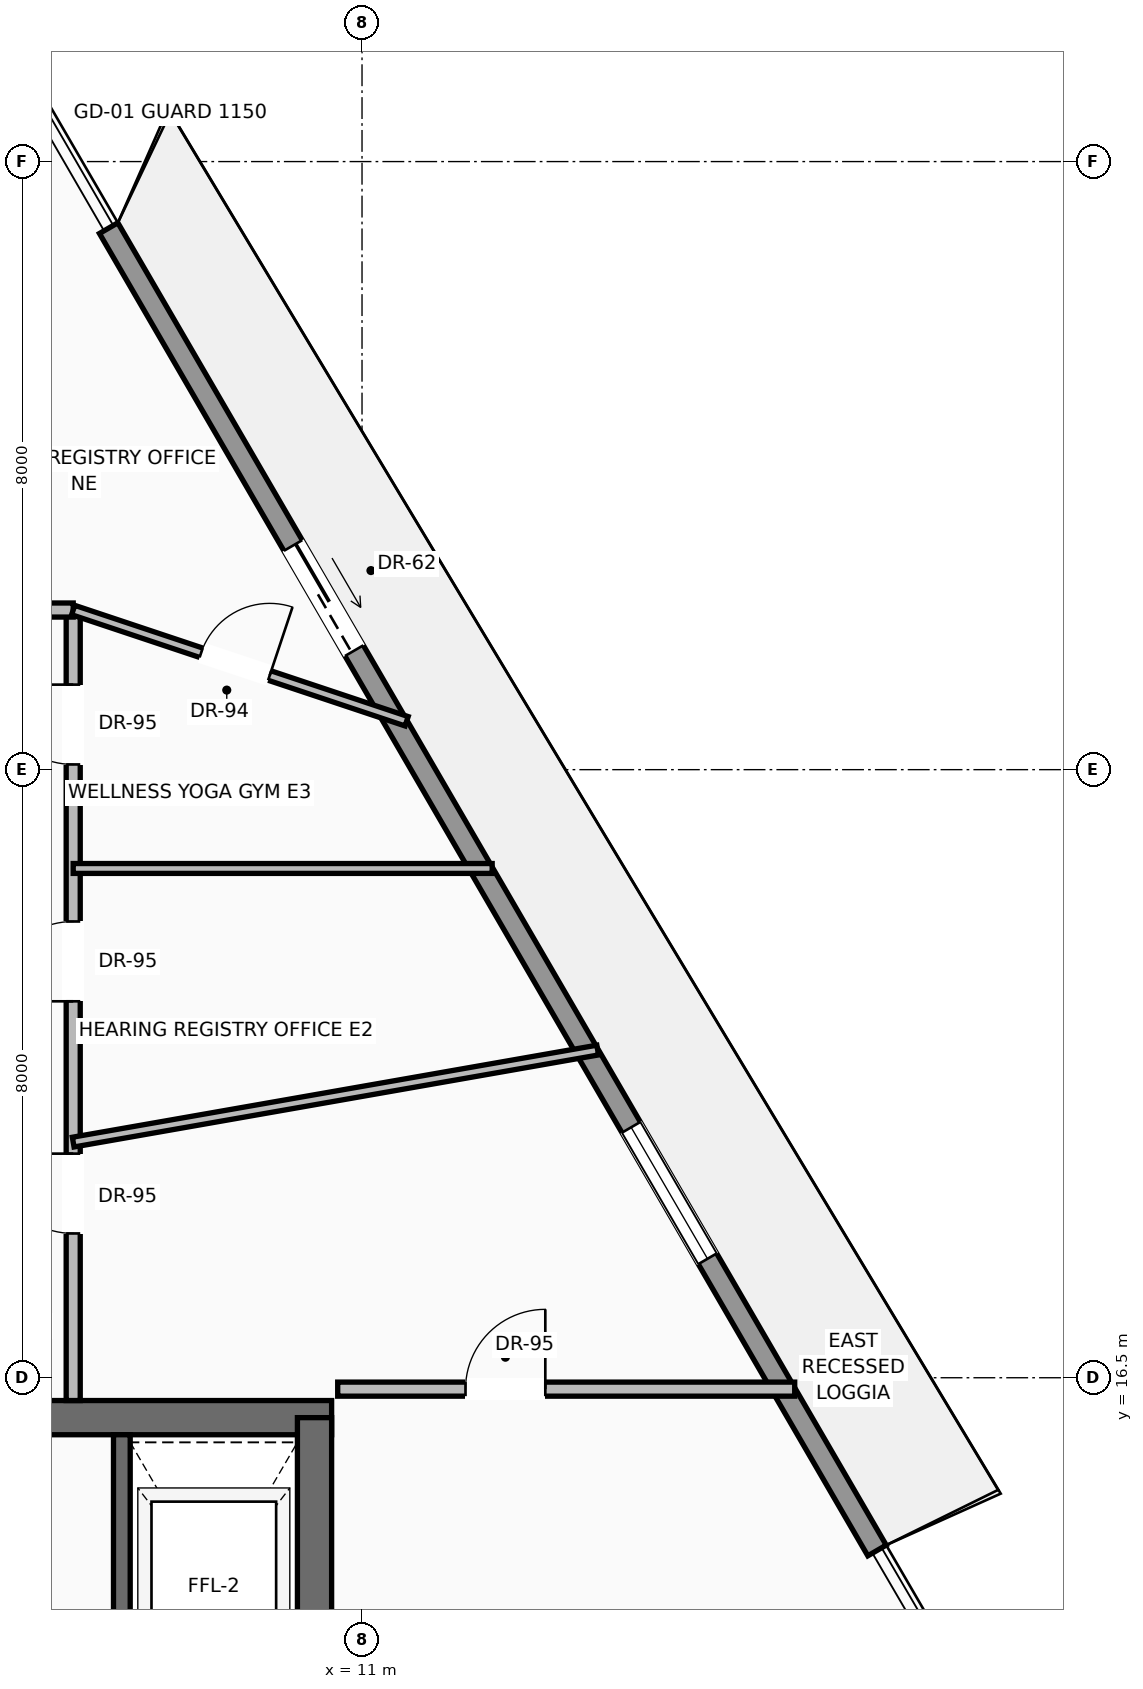
"""IFC4 building model, lengths in metres.
Left out: names, types, materials, properties, quantities, classifications, styles, units other than length and angle.
Written with IfcOpenShell. Run it as: python <this file> out.ifc"""

import sys

from ifc_helpers import new_model, si_unit, direction, frame, frame_2d, origin, place, context, subcontext, project, spatial, rectangle, extrude, source, transform, mapped, element, fill, save


model = new_model("IFC4")
c1 = context("Model", 3, precision=1e-05, world=origin(), true_north=direction((0.0, 1.0)))
c2 = subcontext(c1, "Body", "Model", "MODEL_VIEW")
j1 = project(units=[si_unit("LENGTHUNIT", "METRE"), si_unit("PLANEANGLEUNIT", "RADIAN")], contexts=[c1])
p1 = place(None, origin())
s1 = spatial("IfcSite", under=j1, at=p1, CompositionType="ELEMENT")
p2 = place(p1, origin())
s2 = spatial("IfcBuilding", under=s1, at=p2, CompositionType="ELEMENT")
p3 = place(p2, frame((0.0, 0.0, 290.25)))
s3 = spatial("IfcBuildingStorey", under=s2, at=p3, CompositionType="ELEMENT", Elevation=290.25)
p4 = place(p3, frame((-10.6, 15.975, 0.0), z_axis=(0.0, 0.0, 1.0), x_axis=(1.0, 0.0, 0.0)))
e1 = element("IfcWall", 1, at=p4, inside=s3, PredefinedType="SHEAR", context=c2, shape_type="SweptSolid", body=[
    extrude(rectangle(XDim=21.2, YDim=0.45, at=frame_2d((10.6, 0.0))), origin(), (0.0, 0.0, 1.0), 3.24),
])
p5 = place(p4, frame((3.17, 0.0, 0.0)))
e2 = element("IfcOpeningElement", 2, at=p5, cuts=e1, PredefinedType="OPENING", context=c2, shape_type="SweptSolid", body=[
    extrude(rectangle(XDim=1.3, YDim=2.3, at=frame_2d((0.65, 1.15))), frame((0.0, 0.235, 0.0), z_axis=(0.0, -1.0, 0.0), x_axis=(1.0, 0.0, 0.0)), (0.0, 0.0, 1.0), 0.47),
])
p6 = place(p4, frame((9.6, 0.0, 0.0)))
e3 = element("IfcOpeningElement", 3, at=p6, cuts=e1, PredefinedType="OPENING", context=c2, shape_type="SweptSolid", body=[
    extrude(rectangle(XDim=2.0, YDim=2.4, at=frame_2d((1.0, 1.2))), frame((0.0, 0.235, 0.0), z_axis=(0.0, -1.0, 0.0), x_axis=(1.0, 0.0, 0.0)), (0.0, 0.0, 1.0), 0.47),
])
p7 = place(p3, frame((10.375, 0.625, 0.0), z_axis=(0.0, 0.0, 1.0), x_axis=(0.0, 1.0, 0.0)))
e4 = element("IfcWall", 4, at=p7, inside=s3, PredefinedType="SHEAR", context=c2, shape_type="SweptSolid", body=[
    extrude(rectangle(XDim=15.35, YDim=0.45, at=frame_2d((7.675, 0.0))), origin(), (0.0, 0.0, 1.0), 3.24),
])
p8 = place(p3, frame((7.667, 31.624, 0.0), z_axis=(0.0, 0.0, 1.0), x_axis=(0.5024293772, -0.864618251558, 0.0)))
e5 = element("IfcWall", 5, at=p8, inside=s3, PredefinedType="SOLIDWALL", context=c2, shape_type="SweptSolid", body=[
    extrude(rectangle(XDim=20.121, YDim=0.28, at=frame_2d((10.061, 0.0))), origin(), (0.0, 0.0, 1.0), 2.82),
])
p9 = place(p8, frame((4.829, 0.0, 0.0)))
e6 = element("IfcOpeningElement", 6, at=p9, cuts=e5, PredefinedType="OPENING", context=c2, shape_type="SweptSolid", body=[
    extrude(rectangle(XDim=1.6, YDim=2.35, at=frame_2d((0.8, 1.175))), frame((0.0, 0.15, 0.0), z_axis=(0.0, -1.0, 0.0), x_axis=(1.0, 0.0, 0.0)), (0.0, 0.0, 1.0), 0.3),
])
p10 = place(p8, frame((13.682, 0.0, 0.9)))
e7 = element("IfcOpeningElement", 7, at=p10, cuts=e5, PredefinedType="OPENING", context=c2, shape_type="SweptSolid", body=[
    extrude(rectangle(XDim=2.0, YDim=1.75, at=frame_2d((1.0, 0.875))), frame((0.0, 0.15, 0.0), z_axis=(0.0, -1.0, 0.0), x_axis=(1.0, 0.0, 0.0)), (0.0, 0.0, 1.0), 0.3),
])
p11 = place(p3, frame((7.84, 11.87, 0.0), z_axis=(0.0, 0.0, 1.0), x_axis=(0.0, 1.0, 0.0)))
e8 = element("IfcWall", 8, at=p11, inside=s3, PredefinedType="SOLIDWALL", context=c2, shape_type="SweptSolid", body=[
    extrude(rectangle(XDim=3.88, YDim=0.22, at=frame_2d((1.94, 0.0))), origin(), (0.0, 0.0, 1.0), 3.24),
])
p12 = place(p3, frame((7.2, 16.2, 0.0), z_axis=(0.0, 0.0, 1.0), x_axis=(0.0, 1.0, 0.0)))
e9 = element("IfcWall", 9, at=p12, inside=s3, PredefinedType="PARTITIONING", context=c2, shape_type="SweptSolid", body=[
    extrude(rectangle(XDim=10.4, YDim=0.185, at=frame_2d((5.2, 0.0))), origin(), (0.0, 0.0, 1.0), 3.232),
])
p13 = place(p12, frame((2.198, 0.0, 0.0)))
e10 = element("IfcOpeningElement", 10, at=p13, cuts=e9, PredefinedType="OPENING", context=c2, shape_type="SweptSolid", body=[
    extrude(rectangle(XDim=1.05, YDim=2.25, at=frame_2d((0.525, 1.125))), frame((0.0, 0.103, 0.0), z_axis=(0.0, -1.0, 0.0), x_axis=(1.0, 0.0, 0.0)), (0.0, 0.0, 1.0), 0.205),
])
p14 = place(p12, frame((5.252, 0.0, 0.0)))
e11 = element("IfcOpeningElement", 11, at=p14, cuts=e9, PredefinedType="OPENING", context=c2, shape_type="SweptSolid", body=[
    extrude(rectangle(XDim=1.05, YDim=2.25, at=frame_2d((0.525, 1.125))), frame((0.0, 0.103, 0.0), z_axis=(0.0, -1.0, 0.0), x_axis=(1.0, 0.0, 0.0)), (0.0, 0.0, 1.0), 0.205),
])
p15 = place(p12, frame((8.369, 0.0, 0.0)))
e12 = element("IfcOpeningElement", 12, at=p15, cuts=e9, PredefinedType="OPENING", context=c2, shape_type="SweptSolid", body=[
    extrude(rectangle(XDim=1.05, YDim=2.25, at=frame_2d((0.525, 1.125))), frame((0.0, 0.103, 0.0), z_axis=(0.0, -1.0, 0.0), x_axis=(1.0, 0.0, 0.0)), (0.0, 0.0, 1.0), 0.205),
])
p16 = place(p3, frame((-7.2, 26.6, 0.0), z_axis=(0.0, 0.0, 1.0), x_axis=(1.0, 0.0, 0.0)))
e13 = element("IfcWall", 13, at=p16, inside=s3, PredefinedType="PARTITIONING", context=c2, shape_type="SweptSolid", body=[
    extrude(rectangle(XDim=14.4, YDim=0.185, at=frame_2d((7.2, 0.0))), origin(), (0.0, 0.0, 1.0), 3.232),
])
p17 = place(p16, frame((4.698, 0.0, 0.0)))
e14 = element("IfcOpeningElement", 14, at=p17, cuts=e13, PredefinedType="OPENING", context=c2, shape_type="SweptSolid", body=[
    extrude(rectangle(XDim=1.05, YDim=2.25, at=frame_2d((0.525, 1.125))), frame((0.0, 0.103, 0.0), z_axis=(0.0, -1.0, 0.0), x_axis=(1.0, 0.0, 0.0)), (0.0, 0.0, 1.0), 0.205),
])
p18 = place(p16, frame((6.675, 0.0, 0.0)))
e15 = element("IfcOpeningElement", 15, at=p18, cuts=e13, PredefinedType="OPENING", context=c2, shape_type="SweptSolid", body=[
    extrude(rectangle(XDim=1.05, YDim=2.25, at=frame_2d((0.525, 1.125))), frame((0.0, 0.103, 0.0), z_axis=(0.0, -1.0, 0.0), x_axis=(1.0, 0.0, 0.0)), (0.0, 0.0, 1.0), 0.205),
])
p19 = place(p16, frame((8.653, 0.0, 0.0)))
e16 = element("IfcOpeningElement", 16, at=p19, cuts=e13, PredefinedType="OPENING", context=c2, shape_type="SweptSolid", body=[
    extrude(rectangle(XDim=1.05, YDim=2.25, at=frame_2d((0.525, 1.125))), frame((0.0, 0.103, 0.0), z_axis=(0.0, -1.0, 0.0), x_axis=(1.0, 0.0, 0.0)), (0.0, 0.0, 1.0), 0.205),
])
p20 = place(p3, frame((10.68, 16.35, 0.0), z_axis=(0.0, 0.0, 1.0), x_axis=(1.0, 0.0, 0.0)))
e17 = element("IfcWall", 17, at=p20, inside=s3, PredefinedType="PARTITIONING", context=c2, shape_type="SweptSolid", body=[
    extrude(rectangle(XDim=6.013, YDim=0.185, at=frame_2d((3.006, 0.0))), origin(), (0.0, 0.0, 1.0), 3.232),
])
p21 = place(p20, frame((1.681, 0.0, 0.0)))
e18 = element("IfcOpeningElement", 18, at=p21, cuts=e17, PredefinedType="OPENING", context=c2, shape_type="SweptSolid", body=[
    extrude(rectangle(XDim=1.05, YDim=2.25, at=frame_2d((0.525, 1.125))), frame((0.0, 0.103, 0.0), z_axis=(0.0, -1.0, 0.0), x_axis=(1.0, 0.0, 0.0)), (0.0, 0.0, 1.0), 0.205),
])
p22 = place(p3, frame((7.2, 26.6, 0.0), z_axis=(0.0, 0.0, 1.0), x_axis=(0.948614646457, -0.316433646328, 0.0)))
e19 = element("IfcWall", 19, at=p22, inside=s3, PredefinedType="PARTITIONING", context=c2, shape_type="SweptSolid", body=[
    extrude(rectangle(XDim=4.625, YDim=0.13, at=frame_2d((2.312, 0.0))), origin(), (0.0, 0.0, 1.0), 3.232),
])
p23 = place(p22, frame((1.775, 0.0, 0.0)))
e20 = element("IfcOpeningElement", 20, at=p23, cuts=e19, PredefinedType="OPENING", context=c2, shape_type="SweptSolid", body=[
    extrude(rectangle(XDim=0.95, YDim=2.2, at=frame_2d((0.475, 1.1))), frame((0.0, 0.075, 0.0), z_axis=(0.0, -1.0, 0.0), x_axis=(1.0, 0.0, 0.0)), (0.0, 0.0, 1.0), 0.15),
])
p24 = place(p3, frame((7.2, 19.6, 0.0), z_axis=(0.0, 0.0, 1.0), x_axis=(0.984955671934, 0.172807188294, 0.0)))
e21 = element("IfcWall", 21, at=p24, inside=s3, PredefinedType="PARTITIONING", context=c2, shape_type="SweptSolid", body=[
    extrude(rectangle(XDim=7.006, YDim=0.13, at=frame_2d((3.503, 0.0))), origin(), (0.0, 0.0, 1.0), 2.885),
])
p25 = place(p3, frame((7.2, 23.2, 0.0), z_axis=(0.0, 0.0, 1.0), x_axis=(1.0, 0.0, 0.0)))
e22 = element("IfcWall", 22, at=p25, inside=s3, PredefinedType="PARTITIONING", context=c2, shape_type="SweptSolid", body=[
    extrude(rectangle(XDim=5.512, YDim=0.13, at=frame_2d((2.756, 0.0))), origin(), (0.0, 0.0, 1.0), 3.232),
])
m1 = source(origin(), c2, "Body", "SweptSolid", [
    extrude(rectangle(XDim=1.6, YDim=2.35, at=frame_2d((0.8, 1.175))), frame((0.0, 0.025, 0.0), z_axis=(0.0, -1.0, 0.0), x_axis=(1.0, 0.0, 0.0)), (0.0, 0.0, 1.0), 0.05),
])
p26 = place(p9, origin())
e23 = element("IfcDoor", 23, at=p26, inside=s3, OperationType="SLIDING_TO_RIGHT", PredefinedType="DOOR", context=c2, shape_type="MappedRepresentation", body=[
    mapped(m1, transform((0.0, 0.0, 0.0), scale=1.0)),
])
fill(e6, e23)
m2 = source(origin(), c2, "Body", "SweptSolid", [
    extrude(rectangle(XDim=2.0, YDim=1.75, at=frame_2d((1.0, 0.875))), frame((0.0, 0.03, 0.0), z_axis=(0.0, -1.0, 0.0), x_axis=(1.0, 0.0, 0.0)), (0.0, 0.0, 1.0), 0.06),
])
p27 = place(p10, origin())
e24 = element("IfcWindow", 24, at=p27, inside=s3, PartitioningType="SINGLE_PANEL", PredefinedType="WINDOW", context=c2, shape_type="MappedRepresentation", body=[
    mapped(m2, transform((0.0, 0.0, 0.0), scale=1.0)),
])
fill(e7, e24)
m3 = source(origin(), c2, "Body", "SweptSolid", [
    extrude(rectangle(XDim=1.05, YDim=2.25, at=frame_2d((0.525, 1.125))), frame((0.0, 0.025, 0.0), z_axis=(0.0, -1.0, 0.0), x_axis=(1.0, 0.0, 0.0)), (0.0, 0.0, 1.0), 0.05),
])
p28 = place(p21, origin())
e25 = element("IfcDoor", 25, at=p28, inside=s3, OperationType="SINGLE_SWING_RIGHT", PredefinedType="DOOR", context=c2, shape_type="MappedRepresentation", body=[
    mapped(m3, transform((0.0, 0.0, 0.0), scale=1.0)),
])
fill(e18, e25)
p29 = place(p13, origin())
e26 = element("IfcDoor", 26, at=p29, inside=s3, OperationType="SINGLE_SWING_RIGHT", PredefinedType="DOOR", context=c2, shape_type="MappedRepresentation", body=[
    mapped(m3, transform((0.0, 0.0, 0.0), scale=1.0)),
])
fill(e10, e26)
p30 = place(p14, origin())
e27 = element("IfcDoor", 27, at=p30, inside=s3, OperationType="SINGLE_SWING_LEFT", PredefinedType="DOOR", context=c2, shape_type="MappedRepresentation", body=[
    mapped(m3, transform((0.0, 0.0, 0.0), scale=1.0)),
])
fill(e11, e27)
p31 = place(p15, origin())
e28 = element("IfcDoor", 28, at=p31, inside=s3, OperationType="SINGLE_SWING_RIGHT", PredefinedType="DOOR", context=c2, shape_type="MappedRepresentation", body=[
    mapped(m3, transform((0.0, 0.0, 0.0), scale=1.0)),
])
fill(e12, e28)
m4 = source(origin(), c2, "Body", "SweptSolid", [
    extrude(rectangle(XDim=0.95, YDim=2.2, at=frame_2d((0.475, 1.1))), frame((0.0, 0.025, 0.0), z_axis=(0.0, -1.0, 0.0), x_axis=(1.0, 0.0, 0.0)), (0.0, 0.0, 1.0), 0.05),
])
p32 = place(p23, origin())
e29 = element("IfcDoor", 29, at=p32, inside=s3, OperationType="SINGLE_SWING_RIGHT", PredefinedType="DOOR", context=c2, shape_type="MappedRepresentation", body=[
    mapped(m4, transform((0.0, 0.0, 0.0), scale=1.0)),
])
fill(e20, e29)
save(model, sys.argv[1])
